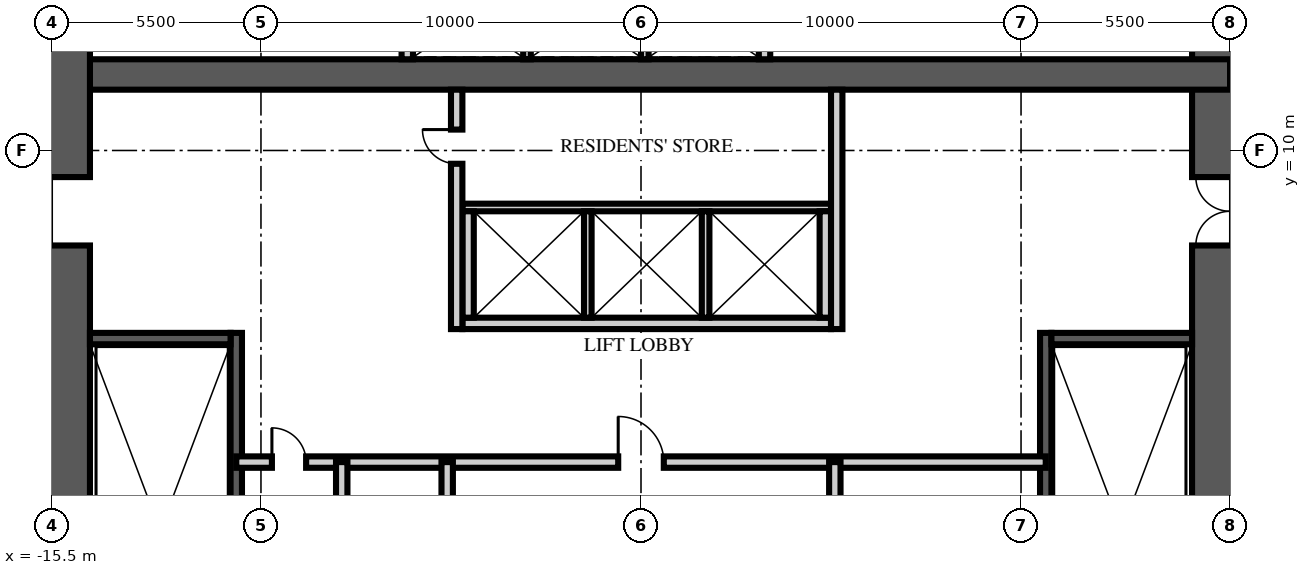
"""IFC4 building model, lengths in metres.
Left out: names, types, materials, properties, quantities, classifications, styles, units other than length and angle.
Written with IfcOpenShell. Run it as: python <this file> out.ifc"""

import sys

from ifc_helpers import new_model, si_unit, direction, frame, frame_2d, origin, place, context, subcontext, project, spatial, rectangle, extrude, element, fill, save


model = new_model("IFC4")
c1 = context("Model", 3, precision=1e-05, world=origin(), true_north=direction((0.0, 1.0)))
c2 = subcontext(c1, "Body", "Model", "MODEL_VIEW")
j1 = project(units=[si_unit("LENGTHUNIT", "METRE"), si_unit("PLANEANGLEUNIT", "RADIAN")], contexts=[c1])
p1 = place(None, origin())
s1 = spatial("IfcSite", under=j1, at=p1, CompositionType="ELEMENT")
p2 = place(p1, origin())
s2 = spatial("IfcBuilding", under=s1, at=p2, CompositionType="ELEMENT")
p3 = place(p2, frame((0.0, 0.0, 73.5)))
s3 = spatial("IfcBuildingStorey", under=s2, at=p3, CompositionType="ELEMENT", Elevation=73.5)
p4 = place(p3, frame((15.5, -15.5, -0.25), z_axis=(0.0, 0.0, 1.0), x_axis=(0.0, 1.0, 0.0)))
e1 = element("IfcWall", 1, at=p4, inside=s3, PredefinedType="SHEAR", context=c2, shape_type="SweptSolid", body=[
    extrude(rectangle(XDim=31.0, YDim=2.0, at=frame_2d((15.5, 0.0))), origin(), (0.0, 0.0, 1.0), 3.75),
])
p5 = place(p4, frame((6.5, 0.0, 0.25)))
e2 = element("IfcOpeningElement", 2, at=p5, cuts=e1, PredefinedType="OPENING", context=c2, shape_type="SweptSolid", body=[
    extrude(rectangle(XDim=1.2, YDim=2.1, at=frame_2d((0.6, 1.05))), frame((0.0, 1.01, 0.0), z_axis=(0.0, -1.0, 0.0), x_axis=(1.0, 0.0, 0.0)), (0.0, 0.0, 1.0), 2.02),
])
p6 = place(p4, frame((23.0, 0.0, 0.25)))
e3 = element("IfcOpeningElement", 3, at=p6, cuts=e1, PredefinedType="OPENING", context=c2, shape_type="SweptSolid", body=[
    extrude(rectangle(XDim=1.8, YDim=2.1, at=frame_2d((0.9, 1.05))), frame((0.0, 1.01, 0.0), z_axis=(0.0, -1.0, 0.0), x_axis=(1.0, 0.0, 0.0)), (0.0, 0.0, 1.0), 2.02),
])
p7 = place(p3, frame((-15.5, 12.0, -0.25), z_axis=(0.0, 0.0, 1.0), x_axis=(1.0, 0.0, 0.0)))
e4 = element("IfcWall", 4, at=p7, inside=s3, PredefinedType="SHEAR", context=c2, shape_type="SweptSolid", body=[
    extrude(rectangle(XDim=31.0, YDim=0.8, at=frame_2d((15.5, 0.0))), origin(), (0.0, 0.0, 1.0), 3.75),
])
p8 = place(p3, frame((-15.5, -15.5, -0.25), z_axis=(0.0, 0.0, 1.0), x_axis=(0.0, 1.0, 0.0)))
e5 = element("IfcWall", 5, at=p8, inside=s3, PredefinedType="SHEAR", context=c2, shape_type="SweptSolid", body=[
    extrude(rectangle(XDim=31.0, YDim=2.0, at=frame_2d((15.5, 0.0))), origin(), (0.0, 0.0, 1.0), 3.75),
])
p9 = place(p8, frame((6.5, 0.0, 0.25)))
e6 = element("IfcOpeningElement", 6, at=p9, cuts=e5, PredefinedType="OPENING", context=c2, shape_type="SweptSolid", body=[
    extrude(rectangle(XDim=1.2, YDim=2.1, at=frame_2d((0.6, 1.05))), frame((0.0, 1.01, 0.0), z_axis=(0.0, -1.0, 0.0), x_axis=(1.0, 0.0, 0.0)), (0.0, 0.0, 1.0), 2.02),
])
p10 = place(p8, frame((23.0, 0.0, 0.25)))
e7 = element("IfcOpeningElement", 7, at=p10, cuts=e5, PredefinedType="OPENING", context=c2, shape_type="SweptSolid", body=[
    extrude(rectangle(XDim=1.8, YDim=2.1, at=frame_2d((0.9, 1.05))), frame((0.0, 1.01, 0.0), z_axis=(0.0, -1.0, 0.0), x_axis=(1.0, 0.0, 0.0)), (0.0, 0.0, 1.0), 2.02),
])
p11 = place(p3, frame((-10.65, -4.9, 0.0), z_axis=(0.0, 0.0, 1.0), x_axis=(0.0, 1.0, 0.0)))
e8 = element("IfcWall", 8, at=p11, inside=s3, PredefinedType="SOLIDWALL", context=c2, shape_type="SweptSolid", body=[
    extrude(rectangle(XDim=10.1, YDim=0.3, at=frame_2d((5.05, 0.0))), origin(), (0.0, 0.0, 1.0), 3.5),
])
p12 = place(p3, frame((-14.5, 5.05, 0.0), z_axis=(0.0, 0.0, 1.0), x_axis=(1.0, 0.0, 0.0)))
e9 = element("IfcWall", 9, at=p12, inside=s3, PredefinedType="SOLIDWALL", context=c2, shape_type="SweptSolid", body=[
    extrude(rectangle(XDim=3.7, YDim=0.3, at=frame_2d((1.85, 0.0))), origin(), (0.0, 0.0, 1.0), 3.5),
])
p13 = place(p3, frame((10.65, -4.9, 0.0), z_axis=(0.0, 0.0, 1.0), x_axis=(0.0, 1.0, 0.0)))
e10 = element("IfcWall", 10, at=p13, inside=s3, PredefinedType="SOLIDWALL", context=c2, shape_type="SweptSolid", body=[
    extrude(rectangle(XDim=10.1, YDim=0.3, at=frame_2d((5.05, 0.0))), origin(), (0.0, 0.0, 1.0), 3.5),
])
p14 = place(p3, frame((14.5, 5.05, 0.0), z_axis=(0.0, 0.0, 1.0), x_axis=(-1.0, 0.0, 0.0)))
e11 = element("IfcWall", 11, at=p14, inside=s3, PredefinedType="SOLIDWALL", context=c2, shape_type="SweptSolid", body=[
    extrude(rectangle(XDim=3.7, YDim=0.3, at=frame_2d((1.85, 0.0))), origin(), (0.0, 0.0, 1.0), 3.5),
])
p15 = place(p3, frame((-4.7, 5.45, 0.0), z_axis=(0.0, 0.0, 1.0), x_axis=(1.0, 0.0, 0.0)))
e12 = element("IfcWall", 12, at=p15, inside=s3, PredefinedType="PARTITIONING", context=c2, shape_type="SweptSolid", body=[
    extrude(rectangle(XDim=9.7, YDim=0.3, at=frame_2d((4.85, 0.0))), origin(), (0.0, 0.0, 1.0), 3.5),
])
p16 = place(p3, frame((-4.7, 8.5, 0.0), z_axis=(0.0, 0.0, 1.0), x_axis=(1.0, 0.0, 0.0)))
e13 = element("IfcWall", 13, at=p16, inside=s3, PredefinedType="PARTITIONING", context=c2, shape_type="SweptSolid", body=[
    extrude(rectangle(XDim=9.7, YDim=0.2, at=frame_2d((4.85, 0.0))), origin(), (0.0, 0.0, 1.0), 3.5),
])
for number, where, z_axis, x_axis in (
    (14, (-4.55, 5.6, 0.0), (0.0, 0.0, 1.0), (0.0, 1.0, 0.0)),
    (15, (4.85, 5.6, 0.0), (0.0, 0.0, 1.0), (0.0, 1.0, 0.0)),
):
    element("IfcWall", number, at=place(p3, frame(where, z_axis=z_axis, x_axis=x_axis)), inside=s3, PredefinedType="PARTITIONING", context=c2, shape_type="SweptSolid", body=[
        extrude(rectangle(XDim=2.8, YDim=0.3, at=frame_2d((1.4, 0.0))), origin(), (0.0, 0.0, 1.0), 3.5),
    ])
for number, where, z_axis, x_axis in (
    (16, (-1.4, 5.6, 0.0), (0.0, 0.0, 1.0), (0.0, 1.0, 0.0)),
    (17, (1.7, 5.6, 0.0), (0.0, 0.0, 1.0), (0.0, 1.0, 0.0)),
):
    element("IfcWall", number, at=place(p3, frame(where, z_axis=z_axis, x_axis=x_axis)), inside=s3, PredefinedType="PARTITIONING", context=c2, shape_type="SweptSolid", body=[
        extrude(rectangle(XDim=2.8, YDim=0.2, at=frame_2d((1.4, 0.0))), origin(), (0.0, 0.0, 1.0), 3.5),
    ])
for number, where, z_axis, x_axis in (
    (18, (-6.15, 12.4, 0.0), (0.0, 0.0, 1.0), (0.0, 1.0, 0.0)),
    (19, (3.25, 12.4, 0.0), (0.0, 0.0, 1.0), (0.0, 1.0, 0.0)),
):
    element("IfcWall", number, at=place(p3, frame(where, z_axis=z_axis, x_axis=x_axis)), inside=s3, PredefinedType="PARTITIONING", context=c2, shape_type="SweptSolid", body=[
        extrude(rectangle(XDim=2.1, YDim=0.3, at=frame_2d((1.05, 0.0))), origin(), (0.0, 0.0, 1.0), 3.5),
    ])
for number, where, z_axis, x_axis in (
    (20, (-3.0, 12.4, 0.0), (0.0, 0.0, 1.0), (0.0, 1.0, 0.0)),
    (21, (0.1, 12.4, 0.0), (0.0, 0.0, 1.0), (0.0, 1.0, 0.0)),
):
    element("IfcWall", number, at=place(p3, frame(where, z_axis=z_axis, x_axis=x_axis)), inside=s3, PredefinedType="PARTITIONING", context=c2, shape_type="SweptSolid", body=[
        extrude(rectangle(XDim=2.1, YDim=0.2, at=frame_2d((1.05, 0.0))), origin(), (0.0, 0.0, 1.0), 3.5),
    ])
p17 = place(p3, frame((-10.65, 1.8, 0.0), z_axis=(0.0, 0.0, 1.0), x_axis=(1.0, 0.0, 0.0)))
e22 = element("IfcWall", 22, at=p17, inside=s3, PredefinedType="PARTITIONING", context=c2, shape_type="SweptSolid", body=[
    extrude(rectangle(XDim=21.3, YDim=0.3, at=frame_2d((10.65, 0.0))), origin(), (0.0, 0.0, 1.0), 3.5),
])
p18 = place(p17, frame((10.05, 0.0, 0.0)))
e23 = element("IfcOpeningElement", 23, at=p18, cuts=e22, PredefinedType="OPENING", context=c2, shape_type="SweptSolid", body=[
    extrude(rectangle(XDim=1.2, YDim=2.1, at=frame_2d((0.6, 1.05))), frame((0.0, 0.16, 0.0), z_axis=(0.0, -1.0, 0.0), x_axis=(1.0, 0.0, 0.0)), (0.0, 0.0, 1.0), 0.32),
])
p19 = place(p17, frame((0.938, 0.0, 0.0)))
e24 = element("IfcOpeningElement", 24, at=p19, cuts=e22, PredefinedType="OPENING", context=c2, shape_type="SweptSolid", body=[
    extrude(rectangle(XDim=0.9, YDim=2.1, at=frame_2d((0.45, 1.05))), frame((0.0, 0.16, 0.0), z_axis=(0.0, -1.0, 0.0), x_axis=(1.0, 0.0, 0.0)), (0.0, 0.0, 1.0), 0.32),
])
p20 = place(p3, frame((-5.1, -6.65, 0.0), z_axis=(0.0, 0.0, 1.0), x_axis=(0.0, 1.0, 0.0)))
e25 = element("IfcWall", 25, at=p20, inside=s3, PredefinedType="PARTITIONING", context=c2, shape_type="SweptSolid", body=[
    extrude(rectangle(XDim=8.45, YDim=0.3, at=frame_2d((4.225, 0.0))), origin(), (0.0, 0.0, 1.0), 3.5),
])
p21 = place(p20, frame((1.7, 0.0, 0.0)))
e26 = element("IfcOpeningElement", 26, at=p21, cuts=e25, PredefinedType="OPENING", context=c2, shape_type="SweptSolid", body=[
    extrude(rectangle(XDim=0.9, YDim=2.1, at=frame_2d((0.45, 1.05))), frame((0.0, 0.16, 0.0), z_axis=(0.0, -1.0, 0.0), x_axis=(1.0, 0.0, 0.0)), (0.0, 0.0, 1.0), 0.32),
])
p22 = place(p20, frame((5.925, 0.0, 0.0)))
e27 = element("IfcOpeningElement", 27, at=p22, cuts=e25, PredefinedType="OPENING", context=c2, shape_type="SweptSolid", body=[
    extrude(rectangle(XDim=0.9, YDim=2.1, at=frame_2d((0.45, 1.05))), frame((0.0, 0.16, 0.0), z_axis=(0.0, -1.0, 0.0), x_axis=(1.0, 0.0, 0.0)), (0.0, 0.0, 1.0), 0.32),
])
p23 = place(p3, frame((5.1, -6.65, 0.0), z_axis=(0.0, 0.0, 1.0), x_axis=(0.0, 1.0, 0.0)))
e28 = element("IfcWall", 28, at=p23, inside=s3, PredefinedType="PARTITIONING", context=c2, shape_type="SweptSolid", body=[
    extrude(rectangle(XDim=8.45, YDim=0.3, at=frame_2d((4.225, 0.0))), origin(), (0.0, 0.0, 1.0), 3.5),
])
p24 = place(p23, frame((1.866, 0.0, 0.0)))
e29 = element("IfcOpeningElement", 29, at=p24, cuts=e28, PredefinedType="OPENING", context=c2, shape_type="SweptSolid", body=[
    extrude(rectangle(XDim=0.9, YDim=2.1, at=frame_2d((0.45, 1.05))), frame((0.0, 0.16, 0.0), z_axis=(0.0, -1.0, 0.0), x_axis=(1.0, 0.0, 0.0)), (0.0, 0.0, 1.0), 0.32),
])
p25 = place(p23, frame((6.091, 0.0, 0.0)))
e30 = element("IfcOpeningElement", 30, at=p25, cuts=e28, PredefinedType="OPENING", context=c2, shape_type="SweptSolid", body=[
    extrude(rectangle(XDim=0.9, YDim=2.1, at=frame_2d((0.45, 1.05))), frame((0.0, 0.16, 0.0), z_axis=(0.0, -1.0, 0.0), x_axis=(1.0, 0.0, 0.0)), (0.0, 0.0, 1.0), 0.32),
])
p26 = place(p3, frame((-7.875, -2.35, 0.0), z_axis=(0.0, 0.0, 1.0), x_axis=(0.0, 1.0, 0.0)))
e31 = element("IfcWall", 31, at=p26, inside=s3, PredefinedType="PARTITIONING", context=c2, shape_type="SweptSolid", body=[
    extrude(rectangle(XDim=4.15, YDim=0.3, at=frame_2d((2.075, 0.0))), origin(), (0.0, 0.0, 1.0), 3.5),
])
p27 = place(p3, frame((-4.85, 5.3, 0.0), z_axis=(0.0, 0.0, 1.0), x_axis=(0.0, 1.0, 0.0)))
e32 = element("IfcWall", 32, at=p27, inside=s3, PredefinedType="PARTITIONING", context=c2, shape_type="SweptSolid", body=[
    extrude(rectangle(XDim=6.3, YDim=0.3, at=frame_2d((3.15, 0.0))), origin(), (0.0, 0.0, 1.0), 3.5),
])
p28 = place(p27, frame((4.35, 0.0, 0.0)))
e33 = element("IfcOpeningElement", 33, at=p28, cuts=e32, PredefinedType="OPENING", context=c2, shape_type="SweptSolid", body=[
    extrude(rectangle(XDim=0.9, YDim=2.1, at=frame_2d((0.45, 1.05))), frame((0.0, 0.16, 0.0), z_axis=(0.0, -1.0, 0.0), x_axis=(1.0, 0.0, 0.0)), (0.0, 0.0, 1.0), 0.32),
])
p29 = place(p3, frame((5.15, 5.3, 0.0), z_axis=(0.0, 0.0, 1.0), x_axis=(0.0, 1.0, 0.0)))
e34 = element("IfcWall", 34, at=p29, inside=s3, PredefinedType="PARTITIONING", context=c2, shape_type="SweptSolid", body=[
    extrude(rectangle(XDim=6.3, YDim=0.3, at=frame_2d((3.15, 0.0))), origin(), (0.0, 0.0, 1.0), 3.5),
])
p30 = place(p10, origin())
e35 = element("IfcDoor", 35, at=p30, inside=s3, OperationType="DOUBLE_DOOR_SINGLE_SWING", PredefinedType="DOOR", context=c2, shape_type="SweptSolid", body=[
    extrude(rectangle(XDim=1.8, YDim=2.1, at=frame_2d((0.9, 1.05))), frame((0.0, 0.025, 0.0), z_axis=(0.0, -1.0, 0.0), x_axis=(1.0, 0.0, 0.0)), (0.0, 0.0, 1.0), 0.05),
])
fill(e7, e35)
p31 = place(p6, origin())
e36 = element("IfcDoor", 36, at=p31, inside=s3, OperationType="DOUBLE_DOOR_SINGLE_SWING", PredefinedType="DOOR", context=c2, shape_type="SweptSolid", body=[
    extrude(rectangle(XDim=1.8, YDim=2.1, at=frame_2d((0.9, 1.05))), frame((0.0, 0.025, 0.0), z_axis=(0.0, -1.0, 0.0), x_axis=(1.0, 0.0, 0.0)), (0.0, 0.0, 1.0), 0.05),
])
fill(e3, e36)
p32 = place(p18, origin())
e37 = element("IfcDoor", 37, at=p32, inside=s3, OperationType="SINGLE_SWING_LEFT", PredefinedType="DOOR", context=c2, shape_type="SweptSolid", body=[
    extrude(rectangle(XDim=1.2, YDim=2.1, at=frame_2d((0.6, 1.05))), frame((0.0, 0.025, 0.0), z_axis=(0.0, -1.0, 0.0), x_axis=(1.0, 0.0, 0.0)), (0.0, 0.0, 1.0), 0.05),
])
fill(e23, e37)
p33 = place(p19, origin())
e38 = element("IfcDoor", 38, at=p33, inside=s3, OperationType="SINGLE_SWING_LEFT", PredefinedType="DOOR", context=c2, shape_type="SweptSolid", body=[
    extrude(rectangle(XDim=0.9, YDim=2.1, at=frame_2d((0.45, 1.05))), frame((0.0, 0.025, 0.0), z_axis=(0.0, -1.0, 0.0), x_axis=(1.0, 0.0, 0.0)), (0.0, 0.0, 1.0), 0.05),
])
fill(e24, e38)
p34 = place(p28, origin())
e39 = element("IfcDoor", 39, at=p34, inside=s3, OperationType="SINGLE_SWING_RIGHT", PredefinedType="DOOR", context=c2, shape_type="SweptSolid", body=[
    extrude(rectangle(XDim=0.9, YDim=2.1, at=frame_2d((0.45, 1.05))), frame((0.0, 0.025, 0.0), z_axis=(0.0, -1.0, 0.0), x_axis=(1.0, 0.0, 0.0)), (0.0, 0.0, 1.0), 0.05),
])
fill(e33, e39)
save(model, sys.argv[1])
